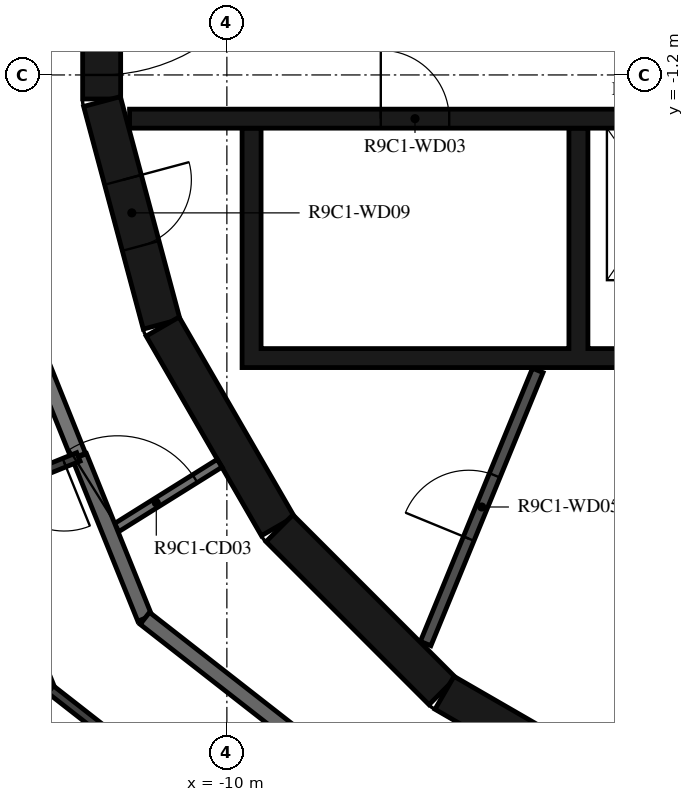
"""IFC4 building model, lengths in metres.
Left out: names, types, materials, properties, quantities, classifications, styles, units other than length and angle.
Written with IfcOpenShell. Run it as: python <this file> out.ifc"""

import sys

from ifc_helpers import new_model, si_unit, direction, frame, frame_2d, origin, place, context, subcontext, project, spatial, polyline, rectangle, outline, extrude, element, fill, save


model = new_model("IFC4")
c1 = context("Model", 3, precision=1e-05, world=origin(), true_north=direction((0.0, 1.0)))
c2 = subcontext(c1, "Body", "Model", "MODEL_VIEW")
j1 = project(units=[si_unit("LENGTHUNIT", "METRE"), si_unit("PLANEANGLEUNIT", "RADIAN")], contexts=[c1])
p1 = place(None, origin())
s1 = spatial("IfcSite", under=j1, at=p1, CompositionType="ELEMENT")
p2 = place(p1, origin())
s2 = spatial("IfcBuilding", under=s1, at=p2, CompositionType="ELEMENT")
p3 = place(p2, frame((0.0, 0.0, 357.5)))
s3 = spatial("IfcBuildingStorey", under=s2, at=p3, CompositionType="ELEMENT", Elevation=357.5)
p4 = place(p3, frame((-11.647, 1.516, 0.0), z_axis=(0.0, 0.0, 1.0), x_axis=(0.0, -1.0, 0.0)))
e1 = element("IfcWall", 1, at=p4, inside=s3, PredefinedType="SHEAR", context=c2, shape_type="SweptSolid", body=[
    extrude(rectangle(XDim=3.033, YDim=0.5, at=frame_2d((1.516, 0.0))), origin(), (0.0, 0.0, 1.0), 3.12),
])
p5 = place(p4, frame((0.316, 0.0, 0.0)))
e2 = element("IfcOpeningElement", 2, at=p5, cuts=e1, PredefinedType="OPENING", context=c2, shape_type="SweptSolid", body=[
    extrude(rectangle(XDim=2.4, YDim=2.1, at=frame_2d((1.2, 1.05))), frame((0.0, 0.26, 0.0), z_axis=(0.0, -1.0, 0.0), x_axis=(1.0, 0.0, 0.0)), (0.0, 0.0, 1.0), 0.52),
])
p6 = place(p3, frame((-11.643, -1.55, 0.0), z_axis=(0.0, 0.0, 1.0), x_axis=(0.258734743916, -0.965948410781, 0.0)))
e3 = element("IfcWall", 3, at=p6, inside=s3, PredefinedType="SHEAR", context=c2, shape_type="SweptSolid", body=[
    extrude(rectangle(XDim=3.033, YDim=0.5, at=frame_2d((1.516, 0.0))), origin(), (0.0, 0.0, 1.0), 3.12),
])
p7 = place(p6, frame((1.066, 0.0, 0.0)))
e4 = element("IfcOpeningElement", 4, at=p7, cuts=e3, PredefinedType="OPENING", context=c2, shape_type="SweptSolid", body=[
    extrude(rectangle(XDim=0.9, YDim=2.1, at=frame_2d((0.45, 1.05))), frame((0.0, 0.26, 0.0), z_axis=(0.0, -1.0, 0.0), x_axis=(1.0, 0.0, 0.0)), (0.0, 0.0, 1.0), 0.52),
])
p8 = place(p3, frame((-10.845, -4.51, 0.0), z_axis=(0.0, 0.0, 1.0), x_axis=(0.500087131594, -0.865975092491, 0.0)))
e5 = element("IfcWall", 5, at=p8, inside=s3, PredefinedType="SHEAR", context=c2, shape_type="SweptSolid", body=[
    extrude(rectangle(XDim=3.033, YDim=0.5, at=frame_2d((1.516, 0.0))), origin(), (0.0, 0.0, 1.0), 3.12),
])
p9 = place(p3, frame((-9.308, -7.164, 0.0), z_axis=(0.0, 0.0, 1.0), x_axis=(0.707106781187, -0.707106781187, 0.0)))
e6 = element("IfcWall", 6, at=p9, inside=s3, PredefinedType="SHEAR", context=c2, shape_type="SweptSolid", body=[
    extrude(rectangle(XDim=3.032, YDim=0.5, at=frame_2d((1.516, 0.0))), origin(), (0.0, 0.0, 1.0), 3.12),
])
p10 = place(p3, frame((-7.137, -9.329, 0.0), z_axis=(0.0, 0.0, 1.0), x_axis=(0.865975092491, -0.500087131594, 0.0)))
e7 = element("IfcWall", 7, at=p10, inside=s3, PredefinedType="SHEAR", context=c2, shape_type="SweptSolid", body=[
    extrude(rectangle(XDim=3.033, YDim=0.5, at=frame_2d((1.516, 0.0))), origin(), (0.0, 0.0, 1.0), 3.12),
])
p11 = place(p3, origin())
e8 = element("IfcWall", 8, at=p11, inside=s3, PredefinedType="SHEAR", context=c2, shape_type="SweptSolid", body=[
    extrude(outline(polyline([(9.8, -5.05), (9.8, -4.8), (9.8, -1.9), (9.55, -1.9), (9.55, -4.8), (7.65, -4.8), (7.65, -1.9), (7.4, -1.9), (7.4, -4.8), (5.5, -4.8), (5.5, -1.9), (5.25, -1.9), (5.25, -4.8), (3.35, -4.8), (3.35, -1.9), (3.1, -1.9), (3.1, -4.8), (1.2, -4.8), (1.2, -1.9), (0.95, -1.9), (0.95, -4.8), (-0.95, -4.8), (-0.95, -1.9), (-1.2, -1.9), (-1.2, -4.8), (-3.1, -4.8), (-3.1, -1.9), (-3.35, -1.9), (-3.35, -4.8), (-5.25, -4.8), (-5.25, -1.9), (-5.5, -1.9), (-5.5, -4.8), (-9.55, -4.8), (-9.55, -1.9), (-9.8, -1.9), (-9.8, -4.8), (-9.8, -5.05), (9.8, -5.05)])), origin(), (0.0, 0.0, 1.0), 3.12),
])
p12 = place(p3, frame((-11.28, -1.775, 0.0), z_axis=(0.0, 0.0, 1.0), x_axis=(1.0, 0.0, 0.0)))
e9 = element("IfcWall", 9, at=p12, inside=s3, PredefinedType="SHEAR", context=c2, shape_type="SweptSolid", body=[
    extrude(rectangle(XDim=14.38, YDim=0.25, at=frame_2d((7.19, 0.0))), origin(), (0.0, 0.0, 1.0), 3.12),
])
p13 = place(p12, frame((6.43, 0.0, 0.0)))
e10 = element("IfcOpeningElement", 10, at=p13, cuts=e9, PredefinedType="OPENING", context=c2, shape_type="SweptSolid", body=[
    extrude(rectangle(XDim=1.1, YDim=2.1, at=frame_2d((0.55, 1.05))), frame((0.0, 0.135, 0.0), z_axis=(0.0, -1.0, 0.0), x_axis=(1.0, 0.0, 0.0)), (0.0, 0.0, 1.0), 0.27),
])
p14 = place(p12, frame((8.58, 0.0, 0.0)))
e11 = element("IfcOpeningElement", 11, at=p14, cuts=e9, PredefinedType="OPENING", context=c2, shape_type="SweptSolid", body=[
    extrude(rectangle(XDim=1.1, YDim=2.1, at=frame_2d((0.55, 1.05))), frame((0.0, 0.135, 0.0), z_axis=(0.0, -1.0, 0.0), x_axis=(1.0, 0.0, 0.0)), (0.0, 0.0, 1.0), 0.27),
])
p15 = place(p12, frame((10.73, 0.0, 0.0)))
e12 = element("IfcOpeningElement", 12, at=p15, cuts=e9, PredefinedType="OPENING", context=c2, shape_type="SweptSolid", body=[
    extrude(rectangle(XDim=1.1, YDim=2.1, at=frame_2d((0.55, 1.05))), frame((0.0, 0.135, 0.0), z_axis=(0.0, -1.0, 0.0), x_axis=(1.0, 0.0, 0.0)), (0.0, 0.0, 1.0), 0.27),
])
p16 = place(p12, frame((3.305, 0.0, 0.0)))
e13 = element("IfcOpeningElement", 13, at=p16, cuts=e9, PredefinedType="OPENING", context=c2, shape_type="SweptSolid", body=[
    extrude(rectangle(XDim=0.9, YDim=2.1, at=frame_2d((0.45, 1.05))), frame((0.0, 0.135, 0.0), z_axis=(0.0, -1.0, 0.0), x_axis=(1.0, 0.0, 0.0)), (0.0, 0.0, 1.0), 0.27),
])
p17 = place(p12, frame((12.98, 0.0, 0.0)))
e14 = element("IfcOpeningElement", 14, at=p17, cuts=e9, PredefinedType="OPENING", context=c2, shape_type="SweptSolid", body=[
    extrude(rectangle(XDim=0.9, YDim=2.1, at=frame_2d((0.45, 1.05))), frame((0.0, 0.135, 0.0), z_axis=(0.0, -1.0, 0.0), x_axis=(1.0, 0.0, 0.0)), (0.0, 0.0, 1.0), 0.27),
])
p18 = place(p3, frame((-7.385, -8.681, 0.0), z_axis=(0.0, 0.0, 1.0), x_axis=(0.379804590409, 0.925066739811, 0.0)))
e15 = element("IfcWall", 15, at=p18, inside=s3, PredefinedType="PARTITIONING", context=c2, shape_type="SweptSolid", body=[
    extrude(rectangle(XDim=3.885, YDim=0.15, at=frame_2d((1.942, 0.0))), origin(), (0.0, 0.0, 1.0), 3.12),
])
p19 = place(p18, frame((1.493, 0.0, 0.0)))
e16 = element("IfcOpeningElement", 16, at=p19, cuts=e15, PredefinedType="OPENING", context=c2, shape_type="SweptSolid", body=[
    extrude(rectangle(XDim=0.9, YDim=2.1, at=frame_2d((0.45, 1.05))), frame((0.0, 0.085, 0.0), z_axis=(0.0, -1.0, 0.0), x_axis=(1.0, 0.0, 0.0)), (0.0, 0.0, 1.0), 0.17),
])
p20 = place(p3, frame((-11.539, -7.21, 0.0), z_axis=(0.0, 0.0, 1.0), x_axis=(0.848103039868, 0.529831325769, 0.0)))
e17 = element("IfcWall", 17, at=p20, inside=s3, PredefinedType="PARTITIONING", context=c2, shape_type="SweptSolid", body=[
    extrude(rectangle(XDim=1.702, YDim=0.12, at=frame_2d((0.851, 0.0))), origin(), (0.0, 0.0, 1.0), 3.12),
])
p21 = place(p20, frame((0.12, 0.0, 0.0)))
e18 = element("IfcOpeningElement", 18, at=p21, cuts=e17, PredefinedType="OPENING", context=c2, shape_type="SweptSolid", body=[
    extrude(rectangle(XDim=1.2, YDim=2.1, at=frame_2d((0.6, 1.05))), frame((0.0, 0.07, 0.0), z_axis=(0.0, -1.0, 0.0), x_axis=(1.0, 0.0, 0.0)), (0.0, 0.0, 1.0), 0.14),
])
p22 = place(p3, frame((-13.769, -1.691, 0.0), z_axis=(0.0, 0.0, 1.0), x_axis=(0.372720094028, -0.927943819155, 0.0)))
e19 = element("IfcWall", 19, at=p22, inside=s3, PredefinedType="STANDARD", context=c2, shape_type="SweptSolid", body=[
    extrude(rectangle(XDim=4.875, YDim=0.2, at=frame_2d((2.438, 0.0))), origin(), (0.0, 0.0, 1.0), 3.12),
])
p23 = place(p3, frame((-11.939, -6.22, 0.0), z_axis=(0.0, 0.0, 1.0), x_axis=(0.374651128394, -0.927165860024, 0.0)))
e20 = element("IfcWall", 20, at=p23, inside=s3, PredefinedType="STANDARD", context=c2, shape_type="SweptSolid", body=[
    extrude(rectangle(XDim=2.296, YDim=0.2, at=frame_2d((1.148, 0.0))), origin(), (0.0, 0.0, 1.0), 3.12),
])
p24 = place(p3, frame((-11.079, -8.349, 0.0), z_axis=(0.0, 0.0, 1.0), x_axis=(0.78800478687, -0.615669112324, 0.0)))
e21 = element("IfcWall", 21, at=p24, inside=s3, PredefinedType="STANDARD", context=c2, shape_type="SweptSolid", body=[
    extrude(rectangle(XDim=7.181, YDim=0.2, at=frame_2d((3.591, 0.0))), origin(), (0.0, 0.0, 1.0), 3.12),
])
p25 = place(p3, frame((-11.953, -6.225, 0.0), z_axis=(0.0, 0.0, 1.0), x_axis=(-0.927144096717, -0.374704982518, 0.0)))
e22 = element("IfcWall", 22, at=p25, inside=s3, PredefinedType="PARTITIONING", context=c2, shape_type="SweptSolid", body=[
    extrude(rectangle(XDim=1.485, YDim=0.12, at=frame_2d((0.742, 0.0))), origin(), (0.0, 0.0, 1.0), 3.12),
])
p26 = place(p25, frame((0.2, 0.0, 0.0)))
e23 = element("IfcOpeningElement", 23, at=p26, cuts=e22, PredefinedType="OPENING", context=c2, shape_type="SweptSolid", body=[
    extrude(rectangle(XDim=0.9, YDim=2.1, at=frame_2d((0.45, 1.05))), frame((0.0, 0.07, 0.0), z_axis=(0.0, -1.0, 0.0), x_axis=(1.0, 0.0, 0.0)), (0.0, 0.0, 1.0), 0.14),
])
p27 = place(p3, frame((-13.33, -6.782, 0.0), z_axis=(0.0, 0.0, 1.0), x_axis=(0.374602180132, -0.927185637637, 0.0)))
e24 = element("IfcWall", 24, at=p27, inside=s3, PredefinedType="PARTITIONING", context=c2, shape_type="SweptSolid", body=[
    extrude(rectangle(XDim=2.698, YDim=0.12, at=frame_2d((1.349, 0.0))), origin(), (0.0, 0.0, 1.0), 3.12),
])
p28 = place(p3, frame((-12.319, -9.283, 0.0), z_axis=(0.0, 0.0, 1.0), x_axis=(0.788000268464, -0.61567489546, 0.0)))
e25 = element("IfcWall", 25, at=p28, inside=s3, PredefinedType="PARTITIONING", context=c2, shape_type="SweptSolid", body=[
    extrude(rectangle(XDim=7.985, YDim=0.12, at=frame_2d((3.992, 0.0))), origin(), (0.0, 0.0, 1.0), 3.12),
])
p29 = place(p28, frame((6.051, 0.0, 0.0)))
e26 = element("IfcOpeningElement", 26, at=p29, cuts=e25, PredefinedType="OPENING", context=c2, shape_type="SweptSolid", body=[
    extrude(rectangle(XDim=0.9, YDim=2.1, at=frame_2d((0.45, 1.05))), frame((0.0, 0.07, 0.0), z_axis=(0.0, -1.0, 0.0), x_axis=(1.0, 0.0, 0.0)), (0.0, 0.0, 1.0), 0.14),
])
p30 = place(p5, origin())
e27 = element("IfcDoor", 27, at=p30, inside=s3, OperationType="DOUBLE_DOOR_SINGLE_SWING", PredefinedType="DOOR", context=c2, shape_type="SweptSolid", body=[
    extrude(rectangle(XDim=2.4, YDim=2.1, at=frame_2d((1.2, 1.05))), frame((0.0, 0.025, 0.0), z_axis=(0.0, -1.0, 0.0), x_axis=(1.0, 0.0, 0.0)), (0.0, 0.0, 1.0), 0.05),
])
fill(e2, e27)
p31 = place(p16, origin())
e28 = element("IfcDoor", 28, at=p31, inside=s3, OperationType="SINGLE_SWING_LEFT", PredefinedType="DOOR", context=c2, shape_type="SweptSolid", body=[
    extrude(rectangle(XDim=0.9, YDim=2.1, at=frame_2d((0.45, 1.05))), frame((0.0, 0.025, 0.0), z_axis=(0.0, -1.0, 0.0), x_axis=(1.0, 0.0, 0.0)), (0.0, 0.0, 1.0), 0.05),
])
fill(e13, e28)
p32 = place(p19, origin())
e29 = element("IfcDoor", 29, at=p32, inside=s3, OperationType="SINGLE_SWING_LEFT", PredefinedType="DOOR", context=c2, shape_type="SweptSolid", body=[
    extrude(rectangle(XDim=0.9, YDim=2.1, at=frame_2d((0.45, 1.05))), frame((0.0, 0.025, 0.0), z_axis=(0.0, -1.0, 0.0), x_axis=(1.0, 0.0, 0.0)), (0.0, 0.0, 1.0), 0.05),
])
fill(e16, e29)
p33 = place(p7, origin())
e30 = element("IfcDoor", 30, at=p33, inside=s3, OperationType="SINGLE_SWING_LEFT", PredefinedType="DOOR", context=c2, shape_type="SweptSolid", body=[
    extrude(rectangle(XDim=0.9, YDim=2.1, at=frame_2d((0.45, 1.05))), frame((0.0, 0.025, 0.0), z_axis=(0.0, -1.0, 0.0), x_axis=(1.0, 0.0, 0.0)), (0.0, 0.0, 1.0), 0.05),
])
fill(e4, e30)
p34 = place(p26, origin())
e31 = element("IfcDoor", 31, at=p34, inside=s3, OperationType="SINGLE_SWING_LEFT", PredefinedType="DOOR", context=c2, shape_type="SweptSolid", body=[
    extrude(rectangle(XDim=0.9, YDim=2.1, at=frame_2d((0.45, 1.05))), frame((0.0, 0.025, 0.0), z_axis=(0.0, -1.0, 0.0), x_axis=(1.0, 0.0, 0.0)), (0.0, 0.0, 1.0), 0.05),
])
fill(e23, e31)
p35 = place(p21, origin())
e32 = element("IfcDoor", 32, at=p35, inside=s3, OperationType="DOUBLE_DOOR_SINGLE_SWING", PredefinedType="DOOR", context=c2, shape_type="SweptSolid", body=[
    extrude(rectangle(XDim=1.2, YDim=2.1, at=frame_2d((0.6, 1.05))), frame((0.0, 0.025, 0.0), z_axis=(0.0, -1.0, 0.0), x_axis=(1.0, 0.0, 0.0)), (0.0, 0.0, 1.0), 0.05),
])
fill(e18, e32)
save(model, sys.argv[1])
